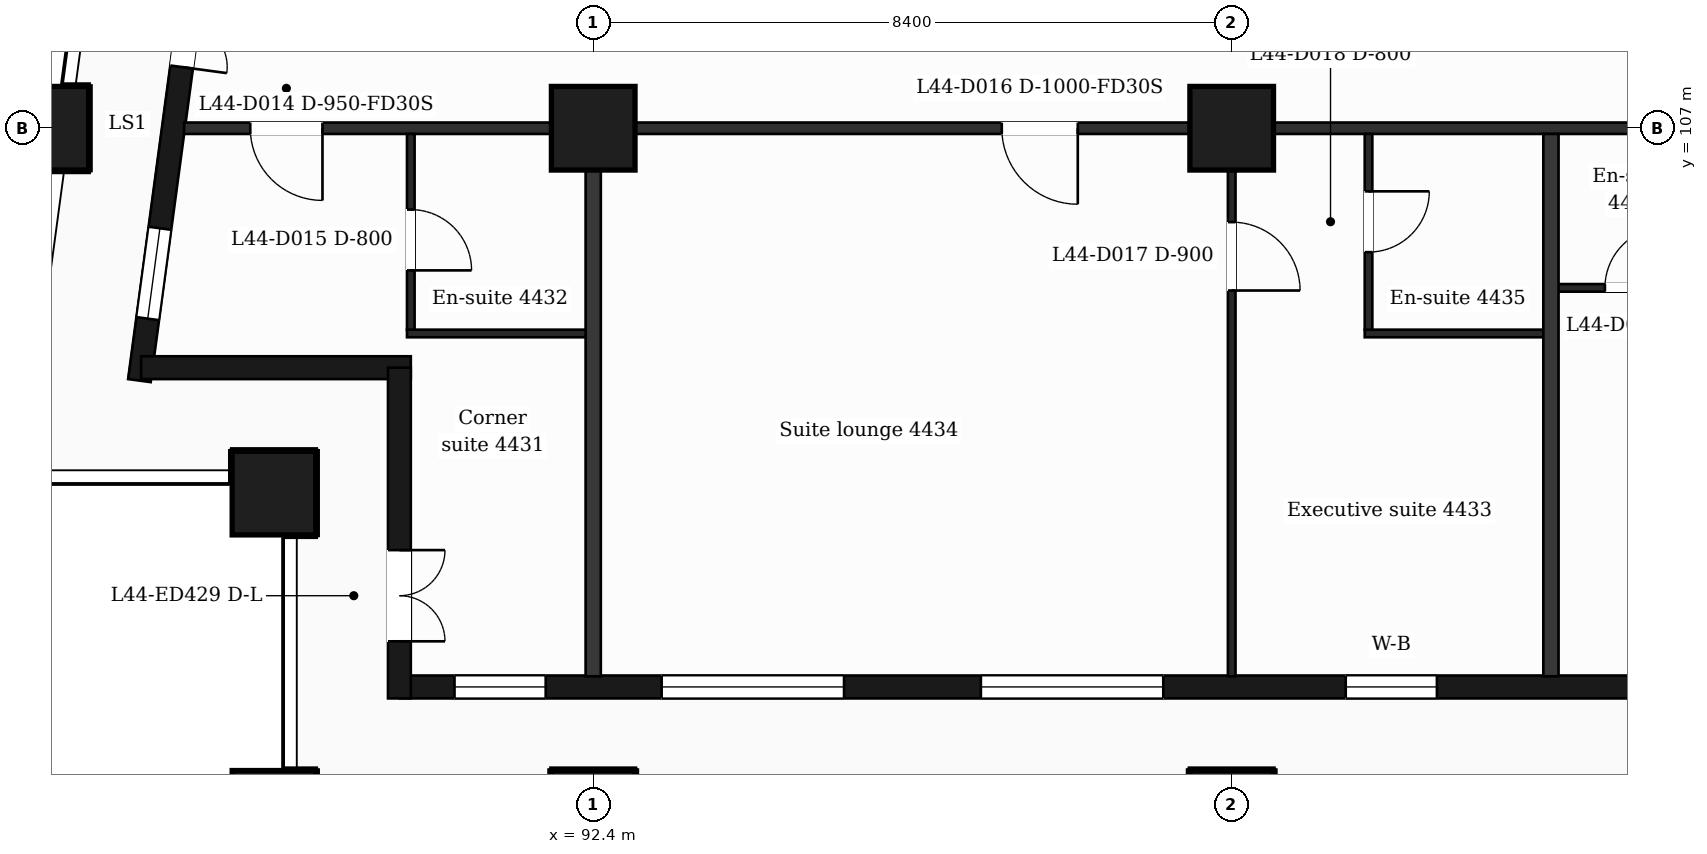
"""IFC4 building model, lengths in metres.
Left out: names, types, materials, properties, quantities, classifications, styles, units other than length and angle.
Written with IfcOpenShell. Run it as: python <this file> out.ifc"""

import sys

from ifc_helpers import new_model, si_unit, direction, frame, frame_2d, origin, origin_2d, place, context, subcontext, project, spatial, rectangle, extrude, element, fill, save


model = new_model("IFC4")
c1 = context("Model", 3, precision=1e-05, world=origin(), true_north=direction((0.0, 1.0)))
c2 = subcontext(c1, "Body", "Model", "MODEL_VIEW")
j1 = project(units=[si_unit("LENGTHUNIT", "METRE"), si_unit("PLANEANGLEUNIT", "RADIAN")], contexts=[c1])
p1 = place(None, origin())
s1 = spatial("IfcSite", under=j1, at=p1, CompositionType="ELEMENT")
p2 = place(p1, origin())
s2 = spatial("IfcBuilding", under=s1, at=p2, CompositionType="ELEMENT")
p3 = place(p2, frame((0.0, 0.0, 184.8)))
s3 = spatial("IfcBuildingStorey", under=s2, at=p3, CompositionType="ELEMENT", Elevation=184.8)
for number, where, z_axis, x_axis in (
    (1, (92.4, 98.0, 0.0), (0.0, 0.0, 1.0), (1.0, 0.0, 0.0)),
    (2, (100.8, 98.0, 0.0), (0.0, 0.0, 1.0), (1.0, 0.0, 0.0)),
    (3, (88.2, 98.0, 0.0), (0.0, 0.0, 1.0), (1.0, 0.0, 0.0)),
    (4, (88.2, 102.2, 0.0), (0.0, 0.0, 1.0), (1.0, 0.0, 0.0)),
    (5, (92.4, 107.0, 0.0), (0.0, 0.0, 1.0), (1.0, 0.0, 0.0)),
    (6, (100.8, 107.0, 0.0), (0.0, 0.0, 1.0), (1.0, 0.0, 0.0)),
    (7, (85.211, 107.0, 0.0), (0.0, 0.0, 1.0), (1.0, 0.0, 0.0)),
):
    element("IfcColumn", number, at=place(p3, frame(where, z_axis=z_axis, x_axis=x_axis)), inside=s3, PredefinedType="COLUMN", context=c2, shape_type="SweptSolid", body=[
        extrude(rectangle(XDim=1.1, YDim=1.1, at=origin_2d()), origin(), (0.0, 0.0, 1.0), 3.7),
    ])
p4 = place(p3, frame((89.85, 99.65, 0.0), z_axis=(0.0, 0.0, 1.0), x_axis=(1.0, 0.0, 0.0)))
e8 = element("IfcWall", 8, at=p4, inside=s3, PredefinedType="SOLIDWALL", context=c2, shape_type="SweptSolid", body=[
    extrude(rectangle(XDim=47.25, YDim=0.3, at=frame_2d((23.625, 0.0))), origin(), (0.0, 0.0, 1.0), 3.38),
])
p5 = place(p4, frame((0.725, 0.0, 0.9)))
e9 = element("IfcOpeningElement", 9, at=p5, cuts=e8, PredefinedType="OPENING", context=c2, shape_type="SweptSolid", body=[
    extrude(rectangle(XDim=1.2, YDim=2.1, at=frame_2d((0.6, 1.05))), frame((0.0, 0.16, 0.0), z_axis=(0.0, -1.0, 0.0), x_axis=(1.0, 0.0, 0.0)), (0.0, 0.0, 1.0), 0.32),
])
p6 = place(p4, frame((3.45, 0.0, 0.9)))
e10 = element("IfcOpeningElement", 10, at=p6, cuts=e8, PredefinedType="OPENING", context=c2, shape_type="SweptSolid", body=[
    extrude(rectangle(XDim=2.4, YDim=2.1, at=frame_2d((1.2, 1.05))), frame((0.0, 0.16, 0.0), z_axis=(0.0, -1.0, 0.0), x_axis=(1.0, 0.0, 0.0)), (0.0, 0.0, 1.0), 0.32),
])
p7 = place(p4, frame((7.65, 0.0, 0.9)))
e11 = element("IfcOpeningElement", 11, at=p7, cuts=e8, PredefinedType="OPENING", context=c2, shape_type="SweptSolid", body=[
    extrude(rectangle(XDim=2.4, YDim=2.1, at=frame_2d((1.2, 1.05))), frame((0.0, 0.16, 0.0), z_axis=(0.0, -1.0, 0.0), x_axis=(1.0, 0.0, 0.0)), (0.0, 0.0, 1.0), 0.32),
])
p8 = place(p4, frame((12.45, 0.0, 0.9)))
e12 = element("IfcOpeningElement", 12, at=p8, cuts=e8, PredefinedType="OPENING", context=c2, shape_type="SweptSolid", body=[
    extrude(rectangle(XDim=1.2, YDim=2.1, at=frame_2d((0.6, 1.05))), frame((0.0, 0.16, 0.0), z_axis=(0.0, -1.0, 0.0), x_axis=(1.0, 0.0, 0.0)), (0.0, 0.0, 1.0), 0.32),
])
p9 = place(p4, frame((16.65, 0.0, 0.9)))
e13 = element("IfcOpeningElement", 13, at=p9, cuts=e8, PredefinedType="OPENING", context=c2, shape_type="SweptSolid", body=[
    extrude(rectangle(XDim=1.2, YDim=2.1, at=frame_2d((0.6, 1.05))), frame((0.0, 0.16, 0.0), z_axis=(0.0, -1.0, 0.0), x_axis=(1.0, 0.0, 0.0)), (0.0, 0.0, 1.0), 0.32),
])
p10 = place(p4, frame((19.95, 0.0, 0.0)))
e14 = element("IfcOpeningElement", 14, at=p10, cuts=e8, PredefinedType="OPENING", context=c2, shape_type="SweptSolid", body=[
    extrude(rectangle(XDim=1.2, YDim=2.4, at=frame_2d((0.6, 1.2))), frame((0.0, 0.16, 0.0), z_axis=(0.0, -1.0, 0.0), x_axis=(1.0, 0.0, 0.0)), (0.0, 0.0, 1.0), 0.32),
])
p11 = place(p4, frame((21.75, 0.0, 0.9)))
e15 = element("IfcOpeningElement", 15, at=p11, cuts=e8, PredefinedType="OPENING", context=c2, shape_type="SweptSolid", body=[
    extrude(rectangle(XDim=1.2, YDim=2.1, at=frame_2d((0.6, 1.05))), frame((0.0, 0.16, 0.0), z_axis=(0.0, -1.0, 0.0), x_axis=(1.0, 0.0, 0.0)), (0.0, 0.0, 1.0), 0.32),
])
p12 = place(p4, frame((24.45, 0.0, 0.9)))
e16 = element("IfcOpeningElement", 16, at=p12, cuts=e8, PredefinedType="OPENING", context=c2, shape_type="SweptSolid", body=[
    extrude(rectangle(XDim=2.4, YDim=2.1, at=frame_2d((1.2, 1.05))), frame((0.0, 0.16, 0.0), z_axis=(0.0, -1.0, 0.0), x_axis=(1.0, 0.0, 0.0)), (0.0, 0.0, 1.0), 0.32),
])
p13 = place(p4, frame((28.35, 0.0, 0.0)))
e17 = element("IfcOpeningElement", 17, at=p13, cuts=e8, PredefinedType="OPENING", context=c2, shape_type="SweptSolid", body=[
    extrude(rectangle(XDim=1.2, YDim=2.4, at=frame_2d((0.6, 1.2))), frame((0.0, 0.16, 0.0), z_axis=(0.0, -1.0, 0.0), x_axis=(1.0, 0.0, 0.0)), (0.0, 0.0, 1.0), 0.32),
])
p14 = place(p4, frame((30.15, 0.0, 0.9)))
e18 = element("IfcOpeningElement", 18, at=p14, cuts=e8, PredefinedType="OPENING", context=c2, shape_type="SweptSolid", body=[
    extrude(rectangle(XDim=1.2, YDim=2.1, at=frame_2d((0.6, 1.05))), frame((0.0, 0.16, 0.0), z_axis=(0.0, -1.0, 0.0), x_axis=(1.0, 0.0, 0.0)), (0.0, 0.0, 1.0), 0.32),
])
p15 = place(p4, frame((32.85, 0.0, 0.9)))
e19 = element("IfcOpeningElement", 19, at=p15, cuts=e8, PredefinedType="OPENING", context=c2, shape_type="SweptSolid", body=[
    extrude(rectangle(XDim=2.4, YDim=2.1, at=frame_2d((1.2, 1.05))), frame((0.0, 0.16, 0.0), z_axis=(0.0, -1.0, 0.0), x_axis=(1.0, 0.0, 0.0)), (0.0, 0.0, 1.0), 0.32),
])
p16 = place(p4, frame((37.05, 0.0, 0.9)))
e20 = element("IfcOpeningElement", 20, at=p16, cuts=e8, PredefinedType="OPENING", context=c2, shape_type="SweptSolid", body=[
    extrude(rectangle(XDim=2.4, YDim=2.1, at=frame_2d((1.2, 1.05))), frame((0.0, 0.16, 0.0), z_axis=(0.0, -1.0, 0.0), x_axis=(1.0, 0.0, 0.0)), (0.0, 0.0, 1.0), 0.32),
])
p17 = place(p4, frame((41.85, 0.0, 0.9)))
e21 = element("IfcOpeningElement", 21, at=p17, cuts=e8, PredefinedType="OPENING", context=c2, shape_type="SweptSolid", body=[
    extrude(rectangle(XDim=1.2, YDim=2.1, at=frame_2d((0.6, 1.05))), frame((0.0, 0.16, 0.0), z_axis=(0.0, -1.0, 0.0), x_axis=(1.0, 0.0, 0.0)), (0.0, 0.0, 1.0), 0.32),
])
p18 = place(p4, frame((45.25, 0.0, 0.9)))
e22 = element("IfcOpeningElement", 22, at=p18, cuts=e8, PredefinedType="OPENING", context=c2, shape_type="SweptSolid", body=[
    extrude(rectangle(XDim=1.2, YDim=2.1, at=frame_2d((0.6, 1.05))), frame((0.0, 0.16, 0.0), z_axis=(0.0, -1.0, 0.0), x_axis=(1.0, 0.0, 0.0)), (0.0, 0.0, 1.0), 0.32),
])
p19 = place(p3, frame((87.334, 110.4, 0.0), z_axis=(0.0, 0.0, 1.0), x_axis=(-0.133437175554, -0.991057273915, 0.0)))
e23 = element("IfcWall", 23, at=p19, inside=s3, PredefinedType="SOLIDWALL", context=c2, shape_type="SweptSolid", body=[
    extrude(rectangle(XDim=6.781, YDim=0.3, at=frame_2d((3.39, 0.0))), origin(), (0.0, 0.0, 1.0), 3.38),
])
p20 = place(p19, frame((1.418, 0.0, 0.0)))
e24 = element("IfcOpeningElement", 24, at=p20, cuts=e23, PredefinedType="OPENING", context=c2, shape_type="SweptSolid", body=[
    extrude(rectangle(XDim=1.2, YDim=2.4, at=frame_2d((0.6, 1.2))), frame((0.0, 0.16, 0.0), z_axis=(0.0, -1.0, 0.0), x_axis=(1.0, 0.0, 0.0)), (0.0, 0.0, 1.0), 0.32),
])
p21 = place(p19, frame((4.758, 0.0, 0.9)))
e25 = element("IfcOpeningElement", 25, at=p21, cuts=e23, PredefinedType="OPENING", context=c2, shape_type="SweptSolid", body=[
    extrude(rectangle(XDim=1.2, YDim=2.1, at=frame_2d((0.6, 1.05))), frame((0.0, 0.16, 0.0), z_axis=(0.0, -1.0, 0.0), x_axis=(1.0, 0.0, 0.0)), (0.0, 0.0, 1.0), 0.32),
])
p22 = place(p3, frame((86.452, 103.85, 0.0), z_axis=(0.0, 0.0, 1.0), x_axis=(1.0, 0.0, 0.0)))
e26 = element("IfcWall", 26, at=p22, inside=s3, PredefinedType="SOLIDWALL", context=c2, shape_type="SweptSolid", body=[
    extrude(rectangle(XDim=3.548, YDim=0.3, at=frame_2d((1.774, 0.0))), origin(), (0.0, 0.0, 1.0), 3.38),
])
p23 = place(p3, frame((89.85, 103.85, 0.0), z_axis=(0.0, 0.0, 1.0), x_axis=(0.0, -1.0, 0.0)))
e27 = element("IfcWall", 27, at=p23, inside=s3, PredefinedType="SOLIDWALL", context=c2, shape_type="SweptSolid", body=[
    extrude(rectangle(XDim=4.35, YDim=0.3, at=frame_2d((2.175, 0.0))), origin(), (0.0, 0.0, 1.0), 3.38),
])
p24 = place(p23, frame((2.4, 0.0, 0.0)))
e28 = element("IfcOpeningElement", 28, at=p24, cuts=e27, PredefinedType="OPENING", context=c2, shape_type="SweptSolid", body=[
    extrude(rectangle(XDim=1.2, YDim=2.4, at=frame_2d((0.6, 1.2))), frame((0.0, 0.16, 0.0), z_axis=(0.0, -1.0, 0.0), x_axis=(1.0, 0.0, 0.0)), (0.0, 0.0, 1.0), 0.32),
])
for number, where, z_axis, x_axis in (
    (29, (89.95, 104.3, 0.0), (0.0, 0.0, 1.0), (1.0, 0.0, 0.0)),
    (30, (102.55, 104.3, 0.0), (0.0, 0.0, 1.0), (1.0, 0.0, 0.0)),
):
    element("IfcWall", number, at=place(p3, frame(where, z_axis=z_axis, x_axis=x_axis)), inside=s3, PredefinedType="PARTITIONING", context=c2, shape_type="SweptSolid", body=[
        extrude(rectangle(XDim=2.45, YDim=0.1, at=frame_2d((1.225, 0.0))), origin(), (0.0, 0.0, 1.0), 3.38),
    ])
p25 = place(p3, frame((105.0, 104.9, 0.0), z_axis=(0.0, 0.0, 1.0), x_axis=(1.0, 0.0, 0.0)))
e31 = element("IfcWall", 31, at=p25, inside=s3, PredefinedType="PARTITIONING", context=c2, shape_type="SweptSolid", body=[
    extrude(rectangle(XDim=2.15, YDim=0.1, at=frame_2d((1.075, 0.0))), origin(), (0.0, 0.0, 1.0), 3.38),
])
p26 = place(p25, frame((0.71, 0.0, 0.0)))
e32 = element("IfcOpeningElement", 32, at=p26, cuts=e31, PredefinedType="OPENING", context=c2, shape_type="SweptSolid", body=[
    extrude(rectangle(XDim=0.8, YDim=2.1, at=frame_2d((0.4, 1.05))), frame((0.0, 0.06, 0.0), z_axis=(0.0, -1.0, 0.0), x_axis=(1.0, 0.0, 0.0)), (0.0, 0.0, 1.0), 0.12),
])
p27 = place(p3, frame((87.018, 107.0, 0.0), z_axis=(0.0, 0.0, 1.0), x_axis=(1.0, 0.0, 0.0)))
e33 = element("IfcWall", 33, at=p27, inside=s3, PredefinedType="PARTITIONING", context=c2, shape_type="SweptSolid", body=[
    extrude(rectangle(XDim=52.765, YDim=0.15, at=frame_2d((26.382, 0.0))), origin(), (0.0, 0.0, 1.0), 3.38),
])
p28 = place(p27, frame((0.87, 0.0, 0.0)))
e34 = element("IfcOpeningElement", 34, at=p28, cuts=e33, PredefinedType="OPENING", context=c2, shape_type="SweptSolid", body=[
    extrude(rectangle(XDim=0.95, YDim=2.1, at=frame_2d((0.475, 1.05))), frame((0.0, 0.085, 0.0), z_axis=(0.0, -1.0, 0.0), x_axis=(1.0, 0.0, 0.0)), (0.0, 0.0, 1.0), 0.17),
])
p29 = place(p27, frame((10.757, 0.0, 0.0)))
e35 = element("IfcOpeningElement", 35, at=p29, cuts=e33, PredefinedType="OPENING", context=c2, shape_type="SweptSolid", body=[
    extrude(rectangle(XDim=1.0, YDim=2.1, at=frame_2d((0.5, 1.05))), frame((0.0, 0.085, 0.0), z_axis=(0.0, -1.0, 0.0), x_axis=(1.0, 0.0, 0.0)), (0.0, 0.0, 1.0), 0.17),
])
p30 = place(p27, frame((20.432, 0.0, 0.0)))
e36 = element("IfcOpeningElement", 36, at=p30, cuts=e33, PredefinedType="OPENING", context=c2, shape_type="SweptSolid", body=[
    extrude(rectangle(XDim=0.95, YDim=2.1, at=frame_2d((0.475, 1.05))), frame((0.0, 0.085, 0.0), z_axis=(0.0, -1.0, 0.0), x_axis=(1.0, 0.0, 0.0)), (0.0, 0.0, 1.0), 0.17),
])
p31 = place(p27, frame((27.752, 0.0, 0.0)))
e37 = element("IfcOpeningElement", 37, at=p31, cuts=e33, PredefinedType="OPENING", context=c2, shape_type="SweptSolid", body=[
    extrude(rectangle(XDim=0.95, YDim=2.1, at=frame_2d((0.475, 1.05))), frame((0.0, 0.085, 0.0), z_axis=(0.0, -1.0, 0.0), x_axis=(1.0, 0.0, 0.0)), (0.0, 0.0, 1.0), 0.17),
])
p32 = place(p27, frame((33.557, 0.0, 0.0)))
e38 = element("IfcOpeningElement", 38, at=p32, cuts=e33, PredefinedType="OPENING", context=c2, shape_type="SweptSolid", body=[
    extrude(rectangle(XDim=0.95, YDim=2.1, at=frame_2d((0.475, 1.05))), frame((0.0, 0.085, 0.0), z_axis=(0.0, -1.0, 0.0), x_axis=(1.0, 0.0, 0.0)), (0.0, 0.0, 1.0), 0.17),
])
p33 = place(p27, frame((35.057, 0.0, 0.0)))
e39 = element("IfcOpeningElement", 39, at=p33, cuts=e33, PredefinedType="OPENING", context=c2, shape_type="SweptSolid", body=[
    extrude(rectangle(XDim=0.95, YDim=2.1, at=frame_2d((0.475, 1.05))), frame((0.0, 0.085, 0.0), z_axis=(0.0, -1.0, 0.0), x_axis=(1.0, 0.0, 0.0)), (0.0, 0.0, 1.0), 0.17),
])
p34 = place(p27, frame((45.407, 0.0, 0.0)))
e40 = element("IfcOpeningElement", 40, at=p34, cuts=e33, PredefinedType="OPENING", context=c2, shape_type="SweptSolid", body=[
    extrude(rectangle(XDim=1.0, YDim=2.1, at=frame_2d((0.5, 1.05))), frame((0.0, 0.085, 0.0), z_axis=(0.0, -1.0, 0.0), x_axis=(1.0, 0.0, 0.0)), (0.0, 0.0, 1.0), 0.17),
])
p35 = place(p27, frame((49.285, 0.0, 0.0)))
e41 = element("IfcOpeningElement", 41, at=p35, cuts=e33, PredefinedType="OPENING", context=c2, shape_type="SweptSolid", body=[
    extrude(rectangle(XDim=0.95, YDim=2.1, at=frame_2d((0.475, 1.05))), frame((0.0, 0.085, 0.0), z_axis=(0.0, -1.0, 0.0), x_axis=(1.0, 0.0, 0.0)), (0.0, 0.0, 1.0), 0.17),
])
p36 = place(p3, frame((90.0, 104.35, 0.0), z_axis=(0.0, 0.0, 1.0), x_axis=(0.0, 1.0, 0.0)))
e42 = element("IfcWall", 42, at=p36, inside=s3, PredefinedType="PARTITIONING", context=c2, shape_type="SweptSolid", body=[
    extrude(rectangle(XDim=2.575, YDim=0.1, at=frame_2d((1.288, 0.0))), origin(), (0.0, 0.0, 1.0), 3.38),
])
p37 = place(p36, frame((0.78, 0.0, 0.0)))
e43 = element("IfcOpeningElement", 43, at=p37, cuts=e42, PredefinedType="OPENING", context=c2, shape_type="SweptSolid", body=[
    extrude(rectangle(XDim=0.8, YDim=2.1, at=frame_2d((0.4, 1.05))), frame((0.0, 0.06, 0.0), z_axis=(0.0, -1.0, 0.0), x_axis=(1.0, 0.0, 0.0)), (0.0, 0.0, 1.0), 0.12),
])
p38 = place(p3, frame((92.4, 99.79, 0.0), z_axis=(0.0, 0.0, 1.0), x_axis=(0.0, 1.0, 0.0)))
e44 = element("IfcWall", 44, at=p38, inside=s3, PredefinedType="PARTITIONING", context=c2, shape_type="SweptSolid", body=[
    extrude(rectangle(XDim=7.135, YDim=0.2, at=frame_2d((3.567, 0.0))), origin(), (0.0, 0.0, 1.0), 3.38),
])
p39 = place(p3, frame((100.8, 99.79, 0.0), z_axis=(0.0, 0.0, 1.0), x_axis=(0.0, 1.0, 0.0)))
e45 = element("IfcWall", 45, at=p39, inside=s3, PredefinedType="PARTITIONING", context=c2, shape_type="SweptSolid", body=[
    extrude(rectangle(XDim=7.135, YDim=0.1, at=frame_2d((3.567, 0.0))), origin(), (0.0, 0.0, 1.0), 3.38),
])
p40 = place(p39, frame((5.075, 0.0, 0.0)))
e46 = element("IfcOpeningElement", 46, at=p40, cuts=e45, PredefinedType="OPENING", context=c2, shape_type="SweptSolid", body=[
    extrude(rectangle(XDim=0.9, YDim=2.1, at=frame_2d((0.45, 1.05))), frame((0.0, 0.06, 0.0), z_axis=(0.0, -1.0, 0.0), x_axis=(1.0, 0.0, 0.0)), (0.0, 0.0, 1.0), 0.12),
])
p41 = place(p3, frame((102.6, 104.35, 0.0), z_axis=(0.0, 0.0, 1.0), x_axis=(0.0, 1.0, 0.0)))
e47 = element("IfcWall", 47, at=p41, inside=s3, PredefinedType="PARTITIONING", context=c2, shape_type="SweptSolid", body=[
    extrude(rectangle(XDim=2.575, YDim=0.1, at=frame_2d((1.288, 0.0))), origin(), (0.0, 0.0, 1.0), 3.38),
])
p42 = place(p41, frame((1.02, 0.0, 0.0)))
e48 = element("IfcOpeningElement", 48, at=p42, cuts=e47, PredefinedType="OPENING", context=c2, shape_type="SweptSolid", body=[
    extrude(rectangle(XDim=0.8, YDim=2.1, at=frame_2d((0.4, 1.05))), frame((0.0, 0.06, 0.0), z_axis=(0.0, -1.0, 0.0), x_axis=(1.0, 0.0, 0.0)), (0.0, 0.0, 1.0), 0.12),
])
p43 = place(p3, frame((105.0, 99.79, 0.0), z_axis=(0.0, 0.0, 1.0), x_axis=(0.0, 1.0, 0.0)))
e49 = element("IfcWall", 49, at=p43, inside=s3, PredefinedType="PARTITIONING", context=c2, shape_type="SweptSolid", body=[
    extrude(rectangle(XDim=7.135, YDim=0.2, at=frame_2d((3.567, 0.0))), origin(), (0.0, 0.0, 1.0), 3.38),
])
p44 = place(p5, origin())
e50 = element("IfcWindow", 50, at=p44, inside=s3, PartitioningType="SINGLE_PANEL", PredefinedType="WINDOW", context=c2, shape_type="SweptSolid", body=[
    extrude(rectangle(XDim=1.2, YDim=2.1, at=frame_2d((0.6, 1.05))), frame((0.0, 0.03, 0.0), z_axis=(0.0, -1.0, 0.0), x_axis=(1.0, 0.0, 0.0)), (0.0, 0.0, 1.0), 0.06),
])
fill(e9, e50)
p45 = place(p6, origin())
e51 = element("IfcWindow", 51, at=p45, inside=s3, PartitioningType="SINGLE_PANEL", PredefinedType="WINDOW", context=c2, shape_type="SweptSolid", body=[
    extrude(rectangle(XDim=2.4, YDim=2.1, at=frame_2d((1.2, 1.05))), frame((0.0, 0.03, 0.0), z_axis=(0.0, -1.0, 0.0), x_axis=(1.0, 0.0, 0.0)), (0.0, 0.0, 1.0), 0.06),
])
fill(e10, e51)
p46 = place(p7, origin())
e52 = element("IfcWindow", 52, at=p46, inside=s3, PartitioningType="SINGLE_PANEL", PredefinedType="WINDOW", context=c2, shape_type="SweptSolid", body=[
    extrude(rectangle(XDim=2.4, YDim=2.1, at=frame_2d((1.2, 1.05))), frame((0.0, 0.03, 0.0), z_axis=(0.0, -1.0, 0.0), x_axis=(1.0, 0.0, 0.0)), (0.0, 0.0, 1.0), 0.06),
])
fill(e11, e52)
p47 = place(p8, origin())
e53 = element("IfcWindow", 53, at=p47, inside=s3, PartitioningType="SINGLE_PANEL", PredefinedType="WINDOW", context=c2, shape_type="SweptSolid", body=[
    extrude(rectangle(XDim=1.2, YDim=2.1, at=frame_2d((0.6, 1.05))), frame((0.0, 0.03, 0.0), z_axis=(0.0, -1.0, 0.0), x_axis=(1.0, 0.0, 0.0)), (0.0, 0.0, 1.0), 0.06),
])
fill(e12, e53)
p48 = place(p20, origin())
e54 = element("IfcDoor", 54, at=p48, inside=s3, OperationType="DOUBLE_DOOR_SINGLE_SWING", PredefinedType="DOOR", context=c2, shape_type="SweptSolid", body=[
    extrude(rectangle(XDim=1.2, YDim=2.4, at=frame_2d((0.6, 1.2))), frame((0.0, 0.025, 0.0), z_axis=(0.0, -1.0, 0.0), x_axis=(1.0, 0.0, 0.0)), (0.0, 0.0, 1.0), 0.05),
])
fill(e24, e54)
p49 = place(p21, origin())
e55 = element("IfcWindow", 55, at=p49, inside=s3, PartitioningType="SINGLE_PANEL", PredefinedType="WINDOW", context=c2, shape_type="SweptSolid", body=[
    extrude(rectangle(XDim=1.2, YDim=2.1, at=frame_2d((0.6, 1.05))), frame((0.0, 0.03, 0.0), z_axis=(0.0, -1.0, 0.0), x_axis=(1.0, 0.0, 0.0)), (0.0, 0.0, 1.0), 0.06),
])
fill(e25, e55)
p50 = place(p24, origin())
e56 = element("IfcDoor", 56, at=p50, inside=s3, OperationType="DOUBLE_DOOR_SINGLE_SWING", PredefinedType="DOOR", context=c2, shape_type="SweptSolid", body=[
    extrude(rectangle(XDim=1.2, YDim=2.4, at=frame_2d((0.6, 1.2))), frame((0.0, 0.025, 0.0), z_axis=(0.0, -1.0, 0.0), x_axis=(1.0, 0.0, 0.0)), (0.0, 0.0, 1.0), 0.05),
])
fill(e28, e56)
p51 = place(p28, origin())
e57 = element("IfcDoor", 57, at=p51, inside=s3, OperationType="SINGLE_SWING_RIGHT", PredefinedType="DOOR", context=c2, shape_type="SweptSolid", body=[
    extrude(rectangle(XDim=0.95, YDim=2.1, at=frame_2d((0.475, 1.05))), frame((0.0, 0.025, 0.0), z_axis=(0.0, -1.0, 0.0), x_axis=(1.0, 0.0, 0.0)), (0.0, 0.0, 1.0), 0.05),
])
fill(e34, e57)
p52 = place(p37, origin())
e58 = element("IfcDoor", 58, at=p52, inside=s3, OperationType="SINGLE_SWING_LEFT", PredefinedType="DOOR", context=c2, shape_type="SweptSolid", body=[
    extrude(rectangle(XDim=0.8, YDim=2.1, at=frame_2d((0.4, 1.05))), frame((0.0, 0.025, 0.0), z_axis=(0.0, -1.0, 0.0), x_axis=(1.0, 0.0, 0.0)), (0.0, 0.0, 1.0), 0.05),
])
fill(e43, e58)
p53 = place(p29, origin())
e59 = element("IfcDoor", 59, at=p53, inside=s3, OperationType="SINGLE_SWING_RIGHT", PredefinedType="DOOR", context=c2, shape_type="SweptSolid", body=[
    extrude(rectangle(XDim=1.0, YDim=2.1, at=frame_2d((0.5, 1.05))), frame((0.0, 0.025, 0.0), z_axis=(0.0, -1.0, 0.0), x_axis=(1.0, 0.0, 0.0)), (0.0, 0.0, 1.0), 0.05),
])
fill(e35, e59)
p54 = place(p40, origin())
e60 = element("IfcDoor", 60, at=p54, inside=s3, OperationType="SINGLE_SWING_LEFT", PredefinedType="DOOR", context=c2, shape_type="SweptSolid", body=[
    extrude(rectangle(XDim=0.9, YDim=2.1, at=frame_2d((0.45, 1.05))), frame((0.0, 0.025, 0.0), z_axis=(0.0, -1.0, 0.0), x_axis=(1.0, 0.0, 0.0)), (0.0, 0.0, 1.0), 0.05),
])
fill(e46, e60)
p55 = place(p42, origin())
e61 = element("IfcDoor", 61, at=p55, inside=s3, OperationType="SINGLE_SWING_RIGHT", PredefinedType="DOOR", context=c2, shape_type="SweptSolid", body=[
    extrude(rectangle(XDim=0.8, YDim=2.1, at=frame_2d((0.4, 1.05))), frame((0.0, 0.025, 0.0), z_axis=(0.0, -1.0, 0.0), x_axis=(1.0, 0.0, 0.0)), (0.0, 0.0, 1.0), 0.05),
])
fill(e48, e61)
p56 = place(p26, origin())
e62 = element("IfcDoor", 62, at=p56, inside=s3, OperationType="SINGLE_SWING_RIGHT", PredefinedType="DOOR", context=c2, shape_type="SweptSolid", body=[
    extrude(rectangle(XDim=0.8, YDim=2.1, at=frame_2d((0.4, 1.05))), frame((0.0, 0.025, 0.0), z_axis=(0.0, -1.0, 0.0), x_axis=(1.0, 0.0, 0.0)), (0.0, 0.0, 1.0), 0.05),
])
fill(e32, e62)
save(model, sys.argv[1])
